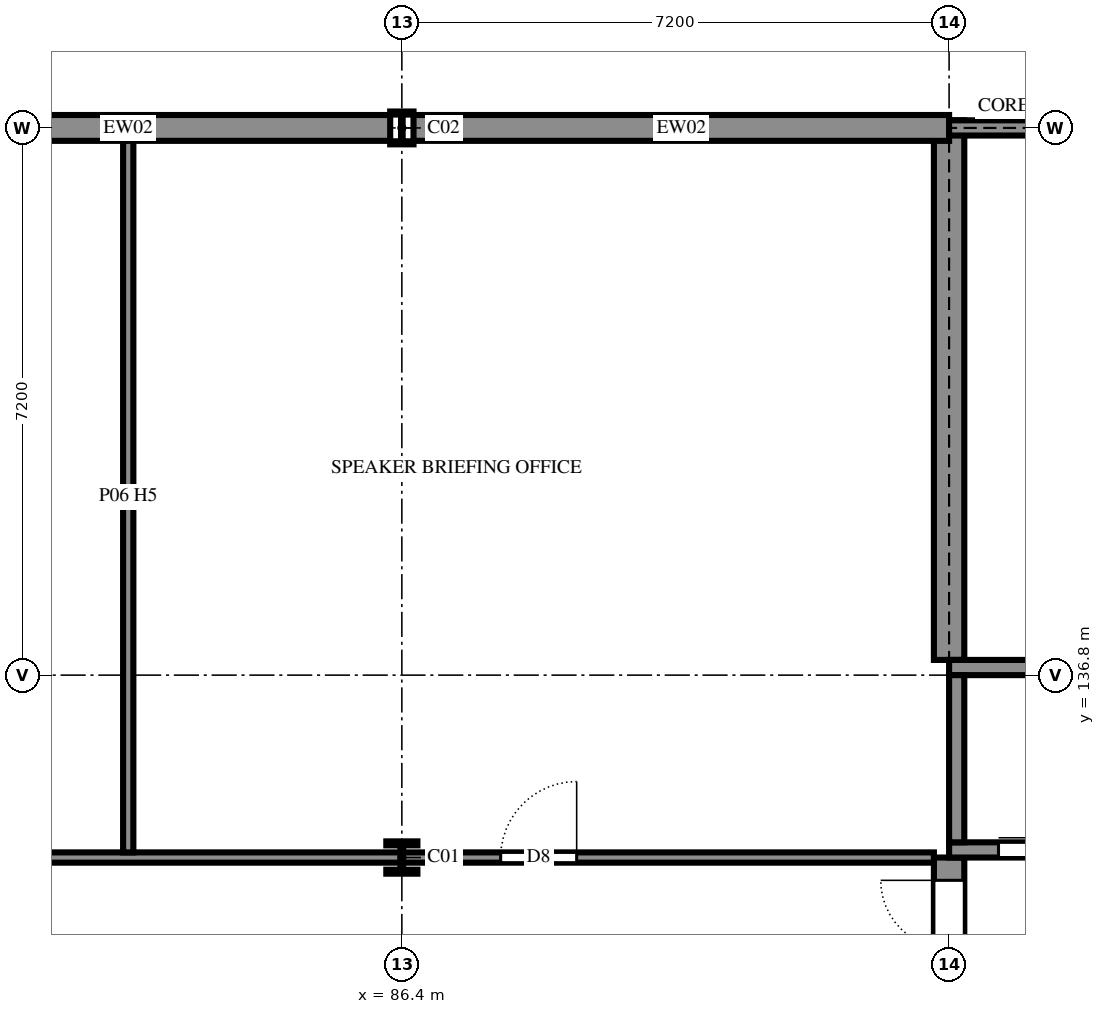
"""IFC4 building model, lengths in metres.
Left out: names, types, materials, properties, quantities, classifications, styles, units other than length and angle.
Written with IfcOpenShell. Run it as: python <this file> out.ifc"""

import sys

from ifc_helpers import new_model, si_unit, direction, frame, frame_2d, origin, origin_2d, place, context, subcontext, project, spatial, rectangle, i_section, extrude, element, fill, save


model = new_model("IFC4")
c1 = context("Model", 3, precision=1e-05, world=origin(), true_north=direction((0.0, 1.0)))
c2 = subcontext(c1, "Body", "Model", "MODEL_VIEW")
j1 = project(units=[si_unit("LENGTHUNIT", "METRE"), si_unit("PLANEANGLEUNIT", "RADIAN")], contexts=[c1])
p1 = place(None, origin())
s1 = spatial("IfcSite", under=j1, at=p1, CompositionType="ELEMENT")
p2 = place(p1, origin())
s2 = spatial("IfcBuilding", under=s1, at=p2, CompositionType="ELEMENT")
p3 = place(p2, frame((0.0, 0.0, 18.0)))
s3 = spatial("IfcBuildingStorey", under=s2, at=p3, CompositionType="ELEMENT", Elevation=18.0)
p4 = place(p3, frame((86.4, 134.4, 0.0), z_axis=(0.0, 0.0, 1.0), x_axis=(1.0, 0.0, 0.0)))
e1 = element("IfcColumn", 1, at=p4, inside=s3, PredefinedType="COLUMN", context=c2, shape_type="SweptSolid", body=[
    extrude(i_section(OverallWidth=0.409, OverallDepth=0.425, WebThickness=0.033, FlangeThickness=0.052, FilletRadius=0.015, at=origin_2d()), origin(), (0.0, 0.0, 1.0), 3.6),
])
p5 = place(p3, frame((86.4, 144.0, 0.0), z_axis=(0.0, 0.0, 1.0), x_axis=(1.0, 0.0, 0.0)))
e2 = element("IfcColumn", 2, at=p5, inside=s3, PredefinedType="COLUMN", context=c2, shape_type="SweptSolid", body=[
    extrude(i_section(OverallWidth=0.307, OverallDepth=0.432, WebThickness=0.021, FlangeThickness=0.04, FilletRadius=0.027, at=origin_2d()), origin(), (0.0, 0.0, 1.0), 3.6),
])
p6 = place(p3, frame((93.6, 132.0, 0.0), z_axis=(0.0, 0.0, 1.0), x_axis=(0.0, 1.0, 0.0)))
e3 = element("IfcWall", 3, at=p6, inside=s3, PredefinedType="SHEAR", context=c2, shape_type="SweptSolid", body=[
    extrude(rectangle(XDim=2.4, YDim=0.4, at=frame_2d((1.2, 0.0))), origin(), (0.0, 0.0, 1.0), 3.6),
])
p7 = place(p6, frame((0.3, 0.0, 0.0)))
e4 = element("IfcOpeningElement", 4, at=p7, cuts=e3, PredefinedType="OPENING", context=c2, shape_type="SweptSolid", body=[
    extrude(rectangle(XDim=1.8, YDim=2.1, at=frame_2d((0.9, 1.05))), frame((0.0, 0.21, 0.0), z_axis=(0.0, -1.0, 0.0), x_axis=(1.0, 0.0, 0.0)), (0.0, 0.0, 1.0), 0.42),
])
p8 = place(p3, frame((93.6, 144.1, 0.0), z_axis=(0.0, 0.0, 1.0), x_axis=(0.0, -1.0, 0.0)))
e5 = element("IfcWall", 5, at=p8, inside=s3, PredefinedType="SHEAR", context=c2, shape_type="SweptSolid", body=[
    extrude(rectangle(XDim=7.1, YDim=0.4, at=frame_2d((3.55, 0.0))), origin(), (0.0, 0.0, 1.0), 3.6),
])
p9 = place(p3, frame((100.975, 144.0, 0.0), z_axis=(0.0, 0.0, 1.0), x_axis=(-1.0, 0.0, 0.0)))
e6 = element("IfcWall", 6, at=p9, inside=s3, PredefinedType="SHEAR", context=c2, shape_type="SweptSolid", body=[
    extrude(rectangle(XDim=7.575, YDim=0.2, at=frame_2d((3.788, 0.0))), origin(), (0.0, 0.0, 1.0), 3.6),
])
p10 = place(p3, frame((93.6, 144.0, 0.0), z_axis=(0.0, 0.0, 1.0), x_axis=(-1.0, 0.0, 0.0)))
e7 = element("IfcWall", 7, at=p10, inside=s3, PredefinedType="SOLIDWALL", context=c2, shape_type="SweptSolid", body=[
    extrude(rectangle(XDim=7.047, YDim=0.34, at=frame_2d((3.523, 0.0))), origin(), (0.0, 0.0, 1.0), 3.16),
])
p11 = place(p3, frame((86.247, 144.0, 0.0), z_axis=(0.0, 0.0, 1.0), x_axis=(-1.0, 0.0, 0.0)))
e8 = element("IfcWall", 8, at=p11, inside=s3, PredefinedType="SOLIDWALL", context=c2, shape_type="SweptSolid", body=[
    extrude(rectangle(XDim=6.893, YDim=0.34, at=frame_2d((3.447, 0.0))), origin(), (0.0, 0.0, 1.0), 3.16),
])
p12 = place(p3, frame((93.6, 134.5, 0.0), z_axis=(0.0, 0.0, 1.0), x_axis=(1.0, 0.0, 0.0)))
e9 = element("IfcWall", 9, at=p12, inside=s3, PredefinedType="SHEAR", context=c2, shape_type="SweptSolid", body=[
    extrude(rectangle(XDim=2.4, YDim=0.2, at=frame_2d((1.2, 0.0))), origin(), (0.0, 0.0, 1.0), 3.6),
])
p13 = place(p12, frame((0.65, 0.0, 0.0)))
e10 = element("IfcOpeningElement", 10, at=p13, cuts=e9, PredefinedType="OPENING", context=c2, shape_type="SweptSolid", body=[
    extrude(rectangle(XDim=1.1, YDim=2.1, at=frame_2d((0.55, 1.05))), frame((0.0, 0.11, 0.0), z_axis=(0.0, -1.0, 0.0), x_axis=(1.0, 0.0, 0.0)), (0.0, 0.0, 1.0), 0.22),
])
p14 = place(p3, frame((93.6, 136.9, 0.0), z_axis=(0.0, 0.0, 1.0), x_axis=(1.0, 0.0, 0.0)))
e11 = element("IfcWall", 11, at=p14, inside=s3, PredefinedType="SHEAR", context=c2, shape_type="SweptSolid", body=[
    extrude(rectangle(XDim=2.4, YDim=0.2, at=frame_2d((1.2, 0.0))), origin(), (0.0, 0.0, 1.0), 3.6),
])
p15 = place(p3, frame((93.7, 134.6, 0.0), z_axis=(0.0, 0.0, 1.0), x_axis=(0.0, 1.0, 0.0)))
e12 = element("IfcWall", 12, at=p15, inside=s3, PredefinedType="SHEAR", context=c2, shape_type="SweptSolid", body=[
    extrude(rectangle(XDim=2.2, YDim=0.2, at=frame_2d((1.1, 0.0))), origin(), (0.0, 0.0, 1.0), 3.6),
])
p16 = place(p3, frame((68.33, 134.4, 0.0), z_axis=(0.0, 0.0, 1.0), x_axis=(1.0, 0.0, 0.0)))
e13 = element("IfcWall", 13, at=p16, inside=s3, PredefinedType="PARTITIONING", context=c2, shape_type="SweptSolid", body=[
    extrude(rectangle(XDim=25.07, YDim=0.135, at=frame_2d((12.535, 0.0))), origin(), (0.0, 0.0, 1.0), 3.16),
])
p17 = place(p16, frame((6.37, 0.0, 0.0)))
e14 = element("IfcOpeningElement", 14, at=p17, cuts=e13, PredefinedType="OPENING", context=c2, shape_type="SweptSolid", body=[
    extrude(rectangle(XDim=1.8, YDim=2.1, at=frame_2d((0.9, 1.05))), frame((0.0, 0.077, 0.0), z_axis=(0.0, -1.0, 0.0), x_axis=(1.0, 0.0, 0.0)), (0.0, 0.0, 1.0), 0.155),
])
p18 = place(p16, frame((19.37, 0.0, 0.0)))
e15 = element("IfcOpeningElement", 15, at=p18, cuts=e13, PredefinedType="OPENING", context=c2, shape_type="SweptSolid", body=[
    extrude(rectangle(XDim=1.0, YDim=2.4, at=frame_2d((0.5, 1.2))), frame((0.0, 0.077, 0.0), z_axis=(0.0, -1.0, 0.0), x_axis=(1.0, 0.0, 0.0)), (0.0, 0.0, 1.0), 0.155),
])
p19 = place(p3, frame((82.8, 134.468, 0.0), z_axis=(0.0, 0.0, 1.0), x_axis=(0.0, 1.0, 0.0)))
e16 = element("IfcWall", 16, at=p19, inside=s3, PredefinedType="PARTITIONING", context=c2, shape_type="SweptSolid", body=[
    extrude(rectangle(XDim=9.363, YDim=0.135, at=frame_2d((4.681, 0.0))), origin(), (0.0, 0.0, 1.0), 3.06),
])
p20 = place(p13, origin())
e17 = element("IfcDoor", 17, at=p20, inside=s3, OperationType="SLIDING_TO_LEFT", PredefinedType="DOOR", context=c2, shape_type="SweptSolid", body=[
    extrude(rectangle(XDim=1.1, YDim=2.1, at=frame_2d((0.55, 1.05))), frame((0.0, 0.025, 0.0), z_axis=(0.0, -1.0, 0.0), x_axis=(1.0, 0.0, 0.0)), (0.0, 0.0, 1.0), 0.05),
])
fill(e10, e17)
p21 = place(p18, origin())
e18 = element("IfcDoor", 18, at=p21, inside=s3, OperationType="SINGLE_SWING_LEFT", PredefinedType="DOOR", context=c2, shape_type="SweptSolid", body=[
    extrude(rectangle(XDim=1.0, YDim=2.4, at=frame_2d((0.5, 1.2))), frame((0.0, 0.025, 0.0), z_axis=(0.0, -1.0, 0.0), x_axis=(1.0, 0.0, 0.0)), (0.0, 0.0, 1.0), 0.05),
])
fill(e15, e18)
p22 = place(p7, origin())
e19 = element("IfcDoor", 19, at=p22, inside=s3, OperationType="DOUBLE_DOOR_SINGLE_SWING", PredefinedType="DOOR", context=c2, shape_type="SweptSolid", body=[
    extrude(rectangle(XDim=1.8, YDim=2.1, at=frame_2d((0.9, 1.05))), frame((0.0, 0.025, 0.0), z_axis=(0.0, -1.0, 0.0), x_axis=(1.0, 0.0, 0.0)), (0.0, 0.0, 1.0), 0.05),
])
fill(e4, e19)
save(model, sys.argv[1])
